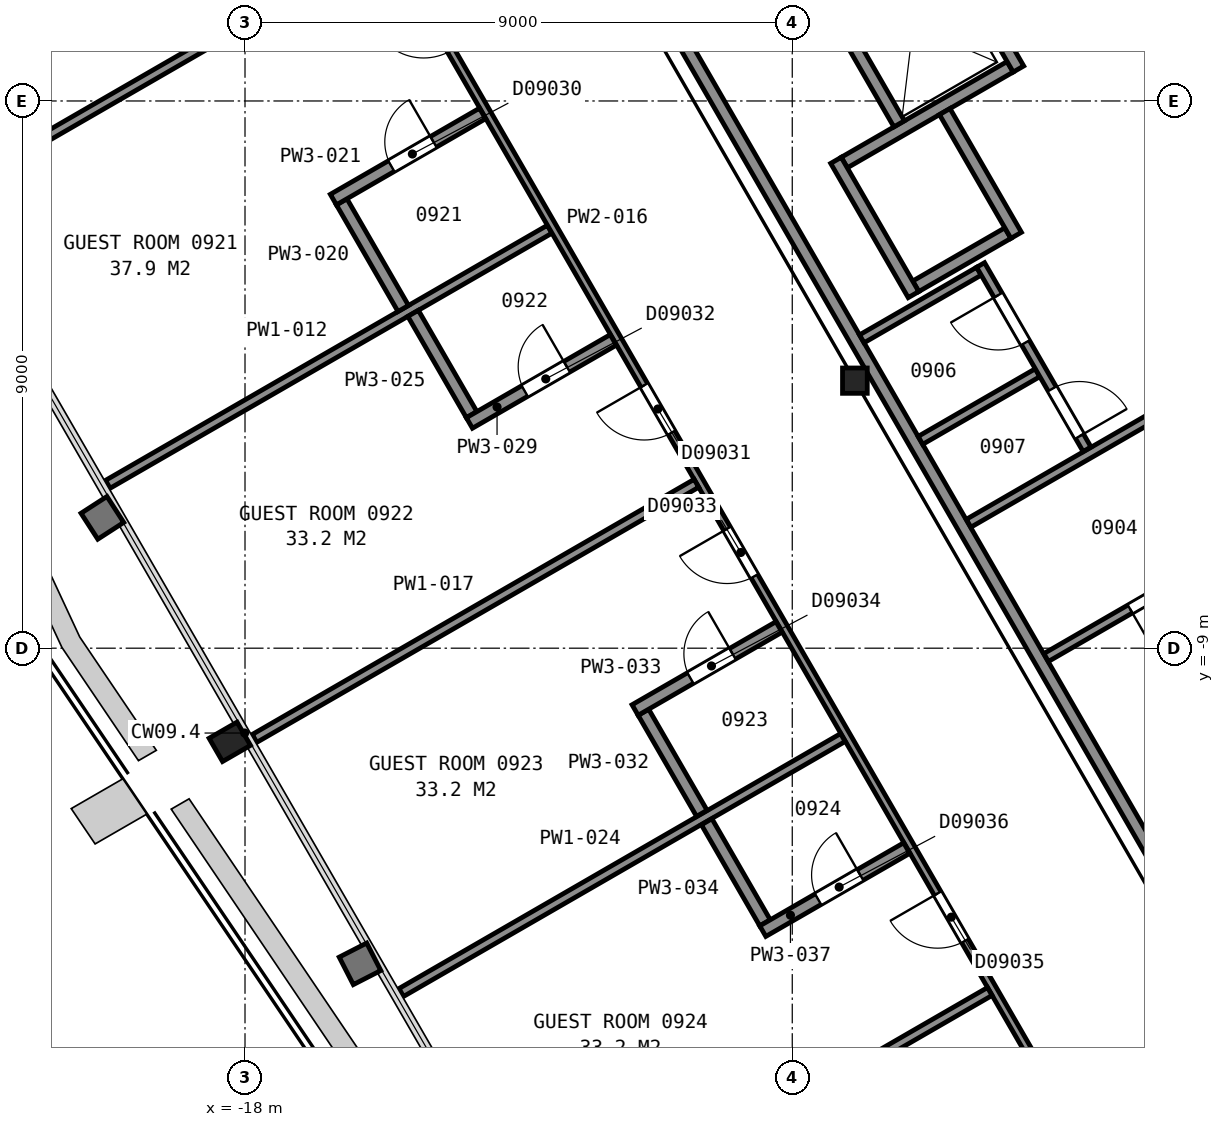
"""IFC4 building model, lengths in metres.
Left out: names, types, materials, properties, quantities, classifications, styles, units other than length and angle.
Written with IfcOpenShell. Run it as: python <this file> out.ifc"""

import sys

from ifc_helpers import new_model, si_unit, direction, frame, frame_2d, origin, origin_2d, place, context, subcontext, project, spatial, rectangle, i_section, extrude, element, fill, save


model = new_model("IFC4")
c1 = context("Model", 3, precision=1e-05, world=origin(), true_north=direction((0.0, 1.0)))
c2 = subcontext(c1, "Body", "Model", "MODEL_VIEW")
j1 = project(units=[si_unit("LENGTHUNIT", "METRE"), si_unit("PLANEANGLEUNIT", "RADIAN")], contexts=[c1])
p1 = place(None, origin())
s1 = spatial("IfcSite", under=j1, at=p1, CompositionType="ELEMENT")
p2 = place(p1, origin())
s2 = spatial("IfcBuilding", under=s1, at=p2, CompositionType="ELEMENT")
p3 = place(p2, frame((0.0, 0.0, 47.6)))
s3 = spatial("IfcBuildingStorey", under=s2, at=p3, CompositionType="ELEMENT", Elevation=47.6)
p4 = place(p3, frame((-18.25, -10.54, 0.025), z_axis=(0.0, 0.0, 1.0), x_axis=(-0.5, 0.866025403784, 0.0)))
e1 = element("IfcColumn", 1, at=p4, inside=s3, PredefinedType="COLUMN", context=c2, shape_type="SweptSolid", body=[
    extrude(i_section(OverallWidth=0.442, OverallDepth=0.531, WebThickness=0.066, FlangeThickness=0.106, FilletRadius=0.015, at=origin_2d()), origin(), (0.0, 0.0, 1.0), 3.575),
])
p5 = place(p3, frame((-7.97, -4.6, 0.0), z_axis=(0.0, 0.0, 1.0), x_axis=(1.0, 0.0, 0.0)))
e2 = element("IfcColumn", 2, at=p5, inside=s3, PredefinedType="COLUMN", context=c2, shape_type="SweptSolid", body=[
    extrude(i_section(OverallWidth=0.406, OverallDepth=0.417, WebThickness=0.03, FlangeThickness=0.048, FilletRadius=0.015, at=origin_2d()), origin(), (0.0, 0.0, 1.0), 3.6),
])
p6 = place(p3, frame((-6.97, -3.048, 0.0), z_axis=(0.0, 0.0, 1.0), x_axis=(0.866036909293, 0.499980071345, 0.0)))
e3 = element("IfcWall", 3, at=p6, inside=s3, PredefinedType="PARTITIONING", context=c2, shape_type="SweptSolid", body=[
    extrude(rectangle(XDim=1.75, YDim=0.2, at=frame_2d((0.875, 0.0))), origin(), (0.0, 0.0, 1.0), 3.6),
])
p7 = place(p3, frame((-8.145, -1.013, 0.0), z_axis=(0.0, 0.0, 1.0), x_axis=(0.866016494683, 0.500015430699, 0.0)))
e4 = element("IfcWall", 4, at=p7, inside=s3, PredefinedType="PARTITIONING", context=c2, shape_type="SweptSolid", body=[
    extrude(rectangle(XDim=3.15, YDim=0.2, at=frame_2d((1.575, 0.0))), origin(), (0.0, 0.0, 1.0), 3.6),
])
p8 = place(p3, frame((-5.28, 0.525, 0.0), z_axis=(0.0, 0.0, 1.0), x_axis=(-0.500037662692, 0.866003658127, 0.0)))
e5 = element("IfcWall", 5, at=p8, inside=s3, PredefinedType="PARTITIONING", context=c2, shape_type="SweptSolid", body=[
    extrude(rectangle(XDim=2.95, YDim=0.2, at=frame_2d((1.475, 0.0))), origin(), (0.0, 0.0, 1.0), 3.6),
])
p9 = place(p8, frame((0.925, 0.0, 0.0)))
e6 = element("IfcOpeningElement", 6, at=p9, cuts=e5, PredefinedType="OPENING", context=c2, shape_type="SweptSolid", body=[
    extrude(rectangle(XDim=1.1, YDim=2.1, at=frame_2d((0.55, 1.05))), frame((0.0, 0.11, 0.0), z_axis=(0.0, -1.0, 0.0), x_axis=(1.0, 0.0, 0.0)), (0.0, 0.0, 1.0), 0.22),
])
p10 = place(p3, frame((-5.318, -2.21, 0.0), z_axis=(0.0, 0.0, 1.0), x_axis=(-0.499938297808, 0.866061024631, 0.0)))
e7 = element("IfcWall", 7, at=p10, inside=s3, PredefinedType="PARTITIONING", context=c2, shape_type="SweptSolid", body=[
    extrude(rectangle(XDim=2.35, YDim=0.2, at=frame_2d((1.175, 0.0))), origin(), (0.0, 0.0, 1.0), 3.6),
])
p11 = place(p3, frame((-7.242, -0.376, 0.0), z_axis=(0.0, 0.0, 1.0), x_axis=(-0.499996545922, 0.866027397988, 0.0)))
e8 = element("IfcWall", 8, at=p11, inside=s3, PredefinedType="PARTITIONING", context=c2, shape_type="SweptSolid", body=[
    extrude(rectangle(XDim=2.75, YDim=0.2, at=frame_2d((1.375, 0.0))), origin(), (0.0, 0.0, 1.0), 3.6),
])
p12 = place(p3, frame((-7.006, -3.185, 0.0), z_axis=(0.0, 0.0, 1.0), x_axis=(-0.499990435942, 0.866030925526, 0.0)))
e9 = element("IfcWall", 9, at=p12, inside=s3, PredefinedType="PARTITIONING", context=c2, shape_type="SweptSolid", body=[
    extrude(rectangle(XDim=2.55, YDim=0.2, at=frame_2d((1.275, 0.0))), origin(), (0.0, 0.0, 1.0), 3.6),
])
p13 = place(p3, frame((-13.664, 5.946, 0.0), z_axis=(0.0, 0.0, 1.0), x_axis=(0.499994327219, -0.866028678941, 0.0)))
e10 = element("IfcWall", 10, at=p13, inside=s3, PredefinedType="PARTITIONING", context=c2, shape_type="SweptSolid", body=[
    extrude(rectangle(XDim=23.968, YDim=0.2, at=frame_2d((11.984, 0.0))), origin(), (0.0, 0.0, 1.0), 3.35),
])
p14 = place(p3, frame((-7.856, -3.912, 0.0), z_axis=(0.0, 0.0, 1.0), x_axis=(0.865971748, 0.500092923031, 0.0)))
e11 = element("IfcWall", 11, at=p14, inside=s3, PredefinedType="PARTITIONING", context=c2, shape_type="SweptSolid", body=[
    extrude(rectangle(XDim=2.225, YDim=0.15, at=frame_2d((1.112, 0.0))), origin(), (0.0, 0.0, 1.0), 3.35),
])
p15 = place(p3, frame((-6.892, -5.582, 0.0), z_axis=(0.0, 0.0, 1.0), x_axis=(0.865944298464, 0.500140452231, 0.0)))
e12 = element("IfcWall", 12, at=p15, inside=s3, PredefinedType="PARTITIONING", context=c2, shape_type="SweptSolid", body=[
    extrude(rectangle(XDim=2.224, YDim=0.15, at=frame_2d((1.112, 0.0))), origin(), (0.0, 0.0, 1.0), 3.35),
])
p16 = place(p3, frame((-6.1, -6.946, 0.0), z_axis=(0.0, 0.0, 1.0), x_axis=(0.866038200431, 0.499977834903, 0.0)))
e13 = element("IfcWall", 13, at=p16, inside=s3, PredefinedType="PARTITIONING", context=c2, shape_type="SweptSolid", body=[
    extrude(rectangle(XDim=4.22, YDim=0.15, at=frame_2d((2.11, 0.0))), origin(), (0.0, 0.0, 1.0), 3.35),
])
p17 = place(p3, frame((-4.152, -5.729, 0.0), z_axis=(0.0, 0.0, 1.0), x_axis=(-0.500024287448, 0.866011380966, 0.0)))
e14 = element("IfcWall", 14, at=p17, inside=s3, PredefinedType="PARTITIONING", context=c2, shape_type="SweptSolid", body=[
    extrude(rectangle(XDim=3.501, YDim=0.15, at=frame_2d((1.75, 0.0))), origin(), (0.0, 0.0, 1.0), 3.35),
])
p18 = place(p17, frame((2.026, 0.0, 0.0)))
e15 = element("IfcOpeningElement", 15, at=p18, cuts=e14, PredefinedType="OPENING", context=c2, shape_type="SweptSolid", body=[
    extrude(rectangle(XDim=0.9, YDim=2.1, at=frame_2d((0.45, 1.05))), frame((0.0, 0.085, 0.0), z_axis=(0.0, -1.0, 0.0), x_axis=(1.0, 0.0, 0.0)), (0.0, 0.0, 1.0), 0.17),
])
p19 = place(p17, frame((0.248, 0.0, 0.0)))
e16 = element("IfcOpeningElement", 16, at=p19, cuts=e14, PredefinedType="OPENING", context=c2, shape_type="SweptSolid", body=[
    extrude(rectangle(XDim=0.9, YDim=2.1, at=frame_2d((0.45, 1.05))), frame((0.0, 0.085, 0.0), z_axis=(0.0, -1.0, 0.0), x_axis=(1.0, 0.0, 0.0)), (0.0, 0.0, 1.0), 0.17),
])
p20 = place(p3, frame((-4.825, -9.154, 0.0), z_axis=(0.0, 0.0, 1.0), x_axis=(0.866023738697, 0.500002884005, 0.0)))
e17 = element("IfcWall", 17, at=p20, inside=s3, PredefinedType="PARTITIONING", context=c2, shape_type="SweptSolid", body=[
    extrude(rectangle(XDim=4.22, YDim=0.15, at=frame_2d((2.11, 0.0))), origin(), (0.0, 0.0, 1.0), 3.35),
])
p21 = place(p20, frame((1.595, 0.0, 0.0)))
e18 = element("IfcOpeningElement", 18, at=p21, cuts=e17, PredefinedType="OPENING", context=c2, shape_type="SweptSolid", body=[
    extrude(rectangle(XDim=0.9, YDim=2.1, at=frame_2d((0.45, 1.05))), frame((0.0, 0.085, 0.0), z_axis=(0.0, -1.0, 0.0), x_axis=(1.0, 0.0, 0.0)), (0.0, 0.0, 1.0), 0.17),
])
p22 = place(p3, frame((-22.984, -1.581, 0.0), z_axis=(0.0, 0.0, 1.0), x_axis=(0.866040157966, 0.499974444137, 0.0)))
e19 = element("IfcWall", 19, at=p22, inside=s3, PredefinedType="PARTITIONING", context=c2, shape_type="SweptSolid", body=[
    extrude(rectangle(XDim=8.387, YDim=0.15, at=frame_2d((4.193, 0.0))), origin(), (0.0, 0.0, 1.0), 2.613),
])
p23 = place(p3, frame((-20.256, -6.305, 0.0), z_axis=(0.0, 0.0, 1.0), x_axis=(0.866037818403, 0.499978496633, 0.0)))
e20 = element("IfcWall", 20, at=p23, inside=s3, PredefinedType="PARTITIONING", context=c2, shape_type="SweptSolid", body=[
    extrude(rectangle(XDim=8.391, YDim=0.15, at=frame_2d((4.196, 0.0))), origin(), (0.0, 0.0, 1.0), 2.613),
])
p24 = place(p3, frame((-3.766, -17.959, 0.0), z_axis=(0.0, 0.0, 1.0), x_axis=(-0.500002884005, 0.866023738697, 0.0)))
e21 = element("IfcWall", 21, at=p24, inside=s3, PredefinedType="PARTITIONING", context=c2, shape_type="SweptSolid", body=[
    extrude(rectangle(XDim=28.135, YDim=0.125, at=frame_2d((14.067, 0.0))), origin(), (0.0, 0.0, 1.0), 2.613),
])
p25 = place(p24, frame((25.422, 0.0, 0.0)))
e22 = element("IfcOpeningElement", 22, at=p25, cuts=e21, PredefinedType="OPENING", context=c2, shape_type="SweptSolid", body=[
    extrude(rectangle(XDim=1.0, YDim=2.1, at=frame_2d((0.5, 1.05))), frame((0.0, 0.073, 0.0), z_axis=(0.0, -1.0, 0.0), x_axis=(1.0, 0.0, 0.0)), (0.0, 0.0, 1.0), 0.145),
])
p26 = place(p24, frame((21.693, 0.0, 0.0)))
e23 = element("IfcOpeningElement", 23, at=p26, cuts=e21, PredefinedType="OPENING", context=c2, shape_type="SweptSolid", body=[
    extrude(rectangle(XDim=0.9, YDim=2.1, at=frame_2d((0.45, 1.05))), frame((0.0, 0.073, 0.0), z_axis=(0.0, -1.0, 0.0), x_axis=(1.0, 0.0, 0.0)), (0.0, 0.0, 1.0), 0.145),
])
p27 = place(p24, frame((14.438, 0.0, 0.0)))
e24 = element("IfcOpeningElement", 24, at=p27, cuts=e21, PredefinedType="OPENING", context=c2, shape_type="SweptSolid", body=[
    extrude(rectangle(XDim=0.9, YDim=2.1, at=frame_2d((0.45, 1.05))), frame((0.0, 0.073, 0.0), z_axis=(0.0, -1.0, 0.0), x_axis=(1.0, 0.0, 0.0)), (0.0, 0.0, 1.0), 0.145),
])
p28 = place(p24, frame((11.712, 0.0, 0.0)))
e25 = element("IfcOpeningElement", 25, at=p28, cuts=e21, PredefinedType="OPENING", context=c2, shape_type="SweptSolid", body=[
    extrude(rectangle(XDim=0.9, YDim=2.1, at=frame_2d((0.45, 1.05))), frame((0.0, 0.073, 0.0), z_axis=(0.0, -1.0, 0.0), x_axis=(1.0, 0.0, 0.0)), (0.0, 0.0, 1.0), 0.145),
])
p29 = place(p24, frame((4.787, 0.0, 0.0)))
e26 = element("IfcOpeningElement", 26, at=p29, cuts=e21, PredefinedType="OPENING", context=c2, shape_type="SweptSolid", body=[
    extrude(rectangle(XDim=0.9, YDim=2.1, at=frame_2d((0.45, 1.05))), frame((0.0, 0.073, 0.0), z_axis=(0.0, -1.0, 0.0), x_axis=(1.0, 0.0, 0.0)), (0.0, 0.0, 1.0), 0.145),
])
p30 = place(p24, frame((1.762, 0.0, 0.0)))
e27 = element("IfcOpeningElement", 27, at=p30, cuts=e21, PredefinedType="OPENING", context=c2, shape_type="SweptSolid", body=[
    extrude(rectangle(XDim=0.9, YDim=2.1, at=frame_2d((0.45, 1.05))), frame((0.0, 0.073, 0.0), z_axis=(0.0, -1.0, 0.0), x_axis=(1.0, 0.0, 0.0)), (0.0, 0.0, 1.0), 0.145),
])
p31 = place(p3, frame((-17.844, -10.484, 0.0), z_axis=(0.0, 0.0, 1.0), x_axis=(0.866037818403, 0.499978496633, 0.0)))
e28 = element("IfcWall", 28, at=p31, inside=s3, PredefinedType="PARTITIONING", context=c2, shape_type="SweptSolid", body=[
    extrude(rectangle(XDim=8.391, YDim=0.15, at=frame_2d((4.196, 0.0))), origin(), (0.0, 0.0, 1.0), 2.613),
])
p32 = place(p3, frame((-16.41, -1.659, 0.0), z_axis=(0.0, 0.0, 1.0), x_axis=(0.49983374806, -0.866121368112, 0.0)))
e29 = element("IfcWall", 29, at=p32, inside=s3, PredefinedType="PARTITIONING", context=c2, shape_type="SweptSolid", body=[
    extrude(rectangle(XDim=2.026, YDim=0.2, at=frame_2d((1.013, 0.0))), origin(), (0.0, 0.0, 1.0), 2.613),
])
p33 = place(p3, frame((-14.094, -0.206, 0.0), z_axis=(0.0, 0.0, 1.0), x_axis=(-0.866033446572, -0.499986069224, 0.0)))
e30 = element("IfcWall", 30, at=p33, inside=s3, PredefinedType="PARTITIONING", context=c2, shape_type="SweptSolid", body=[
    extrude(rectangle(XDim=2.833, YDim=0.2, at=frame_2d((1.416, 0.0))), origin(), (0.0, 0.0, 1.0), 2.613),
])
p34 = place(p33, frame((0.933, 0.0, 0.0)))
e31 = element("IfcOpeningElement", 31, at=p34, cuts=e30, PredefinedType="OPENING", context=c2, shape_type="SweptSolid", body=[
    extrude(rectangle(XDim=0.8, YDim=2.1, at=frame_2d((0.4, 1.05))), frame((0.0, 0.11, 0.0), z_axis=(0.0, -1.0, 0.0), x_axis=(1.0, 0.0, 0.0)), (0.0, 0.0, 1.0), 0.22),
])
p35 = place(p3, frame((-15.431, -14.663, 0.0), z_axis=(0.0, 0.0, 1.0), x_axis=(0.866027553047, 0.499996277349, 0.0)))
e32 = element("IfcWall", 32, at=p35, inside=s3, PredefinedType="PARTITIONING", context=c2, shape_type="SweptSolid", body=[
    extrude(rectangle(XDim=8.387, YDim=0.15, at=frame_2d((4.193, 0.0))), origin(), (0.0, 0.0, 1.0), 2.613),
])
p36 = place(p3, frame((-15.236, -3.493, 0.0), z_axis=(0.0, 0.0, 1.0), x_axis=(0.500190942922, -0.865915134767, 0.0)))
e33 = element("IfcWall", 33, at=p36, inside=s3, PredefinedType="PARTITIONING", context=c2, shape_type="SweptSolid", body=[
    extrude(rectangle(XDim=1.925, YDim=0.2, at=frame_2d((0.962, 0.0))), origin(), (0.0, 0.0, 1.0), 2.613),
])
p37 = place(p3, frame((-14.31, -5.296, 0.0), z_axis=(0.0, 0.0, 1.0), x_axis=(0.866012976267, 0.500021524473, 0.0)))
e34 = element("IfcWall", 34, at=p37, inside=s3, PredefinedType="PARTITIONING", context=c2, shape_type="SweptSolid", body=[
    extrude(rectangle(XDim=2.732, YDim=0.2, at=frame_2d((1.366, 0.0))), origin(), (0.0, 0.0, 1.0), 2.613),
])
p38 = place(p37, frame((1.05, 0.0, 0.0)))
e35 = element("IfcOpeningElement", 35, at=p38, cuts=e34, PredefinedType="OPENING", context=c2, shape_type="SweptSolid", body=[
    extrude(rectangle(XDim=0.8, YDim=2.1, at=frame_2d((0.4, 1.05))), frame((0.0, 0.11, 0.0), z_axis=(0.0, -1.0, 0.0), x_axis=(1.0, 0.0, 0.0)), (0.0, 0.0, 1.0), 0.22),
])
p39 = place(p3, frame((-13.018, -18.842, 0.0), z_axis=(0.0, 0.0, 1.0), x_axis=(0.866003398047, 0.500038113118, 0.0)))
e36 = element("IfcWall", 36, at=p39, inside=s3, PredefinedType="PARTITIONING", context=c2, shape_type="SweptSolid", body=[
    extrude(rectangle(XDim=8.391, YDim=0.15, at=frame_2d((4.195, 0.0))), origin(), (0.0, 0.0, 1.0), 2.613),
])
p40 = place(p3, frame((-11.448, -10.053, 0.0), z_axis=(0.0, 0.0, 1.0), x_axis=(0.500214044309, -0.865901789971, 0.0)))
e37 = element("IfcWall", 37, at=p40, inside=s3, PredefinedType="PARTITIONING", context=c2, shape_type="SweptSolid", body=[
    extrude(rectangle(XDim=1.92, YDim=0.2, at=frame_2d((0.96, 0.0))), origin(), (0.0, 0.0, 1.0), 2.613),
])
p41 = place(p3, frame((-9.218, -8.651, 0.0), z_axis=(0.0, 0.0, 1.0), x_axis=(-0.866063622699, -0.499933797055, 0.0)))
e38 = element("IfcWall", 38, at=p41, inside=s3, PredefinedType="PARTITIONING", context=c2, shape_type="SweptSolid", body=[
    extrude(rectangle(XDim=2.733, YDim=0.2, at=frame_2d((1.367, 0.0))), origin(), (0.0, 0.0, 1.0), 2.613),
])
p42 = place(p41, frame((0.883, 0.0, 0.0)))
e39 = element("IfcOpeningElement", 39, at=p42, cuts=e38, PredefinedType="OPENING", context=c2, shape_type="SweptSolid", body=[
    extrude(rectangle(XDim=0.8, YDim=2.1, at=frame_2d((0.4, 1.05))), frame((0.0, 0.11, 0.0), z_axis=(0.0, -1.0, 0.0), x_axis=(1.0, 0.0, 0.0)), (0.0, 0.0, 1.0), 0.22),
])
p43 = place(p3, frame((-10.407, -11.855, 0.0), z_axis=(0.0, 0.0, 1.0), x_axis=(0.499887618105, -0.86609027778, 0.0)))
e40 = element("IfcWall", 40, at=p43, inside=s3, PredefinedType="PARTITIONING", context=c2, shape_type="SweptSolid", body=[
    extrude(rectangle(XDim=1.919, YDim=0.2, at=frame_2d((0.96, 0.0))), origin(), (0.0, 0.0, 1.0), 2.613),
])
p44 = place(p3, frame((-9.485, -13.654, 0.0), z_axis=(0.0, 0.0, 1.0), x_axis=(0.866102295869, 0.499866795347, 0.0)))
e41 = element("IfcWall", 41, at=p44, inside=s3, PredefinedType="PARTITIONING", context=c2, shape_type="SweptSolid", body=[
    extrude(rectangle(XDim=2.733, YDim=0.2, at=frame_2d((1.367, 0.0))), origin(), (0.0, 0.0, 1.0), 2.613),
])
p45 = place(p44, frame((1.05, 0.0, 0.0)))
e42 = element("IfcOpeningElement", 42, at=p45, cuts=e41, PredefinedType="OPENING", context=c2, shape_type="SweptSolid", body=[
    extrude(rectangle(XDim=0.8, YDim=2.1, at=frame_2d((0.4, 1.05))), frame((0.0, 0.11, 0.0), z_axis=(0.0, -1.0, 0.0), x_axis=(1.0, 0.0, 0.0)), (0.0, 0.0, 1.0), 0.22),
])
p46 = place(p18, origin())
e43 = element("IfcDoor", 43, at=p46, inside=s3, OperationType="SINGLE_SWING_RIGHT", PredefinedType="DOOR", context=c2, shape_type="SweptSolid", body=[
    extrude(rectangle(XDim=0.9, YDim=2.1, at=frame_2d((0.45, 1.05))), frame((0.0, 0.025, 0.0), z_axis=(0.0, -1.0, 0.0), x_axis=(1.0, 0.0, 0.0)), (0.0, 0.0, 1.0), 0.05),
])
fill(e15, e43)
p47 = place(p19, origin())
e44 = element("IfcDoor", 44, at=p47, inside=s3, OperationType="SINGLE_SWING_LEFT", PredefinedType="DOOR", context=c2, shape_type="SweptSolid", body=[
    extrude(rectangle(XDim=0.9, YDim=2.1, at=frame_2d((0.45, 1.05))), frame((0.0, 0.025, 0.0), z_axis=(0.0, -1.0, 0.0), x_axis=(1.0, 0.0, 0.0)), (0.0, 0.0, 1.0), 0.05),
])
fill(e16, e44)
p48 = place(p21, origin())
e45 = element("IfcDoor", 45, at=p48, inside=s3, OperationType="SINGLE_SWING_LEFT", PredefinedType="DOOR", context=c2, shape_type="SweptSolid", body=[
    extrude(rectangle(XDim=0.9, YDim=2.1, at=frame_2d((0.45, 1.05))), frame((0.0, 0.025, 0.0), z_axis=(0.0, -1.0, 0.0), x_axis=(1.0, 0.0, 0.0)), (0.0, 0.0, 1.0), 0.05),
])
fill(e18, e45)
p49 = place(p27, origin())
e46 = element("IfcDoor", 46, at=p49, inside=s3, OperationType="SINGLE_SWING_RIGHT", PredefinedType="DOOR", context=c2, shape_type="SweptSolid", body=[
    extrude(rectangle(XDim=0.9, YDim=2.1, at=frame_2d((0.45, 1.05))), frame((0.0, 0.025, 0.0), z_axis=(0.0, -1.0, 0.0), x_axis=(1.0, 0.0, 0.0)), (0.0, 0.0, 1.0), 0.05),
])
fill(e24, e46)
p50 = place(p28, origin())
e47 = element("IfcDoor", 47, at=p50, inside=s3, OperationType="SINGLE_SWING_RIGHT", PredefinedType="DOOR", context=c2, shape_type="SweptSolid", body=[
    extrude(rectangle(XDim=0.9, YDim=2.1, at=frame_2d((0.45, 1.05))), frame((0.0, 0.025, 0.0), z_axis=(0.0, -1.0, 0.0), x_axis=(1.0, 0.0, 0.0)), (0.0, 0.0, 1.0), 0.05),
])
fill(e25, e47)
p51 = place(p29, origin())
e48 = element("IfcDoor", 48, at=p51, inside=s3, OperationType="SINGLE_SWING_RIGHT", PredefinedType="DOOR", context=c2, shape_type="SweptSolid", body=[
    extrude(rectangle(XDim=0.9, YDim=2.1, at=frame_2d((0.45, 1.05))), frame((0.0, 0.025, 0.0), z_axis=(0.0, -1.0, 0.0), x_axis=(1.0, 0.0, 0.0)), (0.0, 0.0, 1.0), 0.05),
])
fill(e26, e48)
p52 = place(p34, origin())
e49 = element("IfcDoor", 49, at=p52, inside=s3, OperationType="SINGLE_SWING_LEFT", PredefinedType="DOOR", context=c2, shape_type="SweptSolid", body=[
    extrude(rectangle(XDim=0.8, YDim=2.1, at=frame_2d((0.4, 1.05))), frame((0.0, 0.025, 0.0), z_axis=(0.0, -1.0, 0.0), x_axis=(1.0, 0.0, 0.0)), (0.0, 0.0, 1.0), 0.05),
])
fill(e31, e49)
p53 = place(p38, origin())
e50 = element("IfcDoor", 50, at=p53, inside=s3, OperationType="SINGLE_SWING_RIGHT", PredefinedType="DOOR", context=c2, shape_type="SweptSolid", body=[
    extrude(rectangle(XDim=0.8, YDim=2.1, at=frame_2d((0.4, 1.05))), frame((0.0, 0.025, 0.0), z_axis=(0.0, -1.0, 0.0), x_axis=(1.0, 0.0, 0.0)), (0.0, 0.0, 1.0), 0.05),
])
fill(e35, e50)
p54 = place(p42, origin())
e51 = element("IfcDoor", 51, at=p54, inside=s3, OperationType="SINGLE_SWING_LEFT", PredefinedType="DOOR", context=c2, shape_type="SweptSolid", body=[
    extrude(rectangle(XDim=0.8, YDim=2.1, at=frame_2d((0.4, 1.05))), frame((0.0, 0.025, 0.0), z_axis=(0.0, -1.0, 0.0), x_axis=(1.0, 0.0, 0.0)), (0.0, 0.0, 1.0), 0.05),
])
fill(e39, e51)
p55 = place(p45, origin())
e52 = element("IfcDoor", 52, at=p55, inside=s3, OperationType="SINGLE_SWING_RIGHT", PredefinedType="DOOR", context=c2, shape_type="SweptSolid", body=[
    extrude(rectangle(XDim=0.8, YDim=2.1, at=frame_2d((0.4, 1.05))), frame((0.0, 0.025, 0.0), z_axis=(0.0, -1.0, 0.0), x_axis=(1.0, 0.0, 0.0)), (0.0, 0.0, 1.0), 0.05),
])
fill(e42, e52)
save(model, sys.argv[1])
